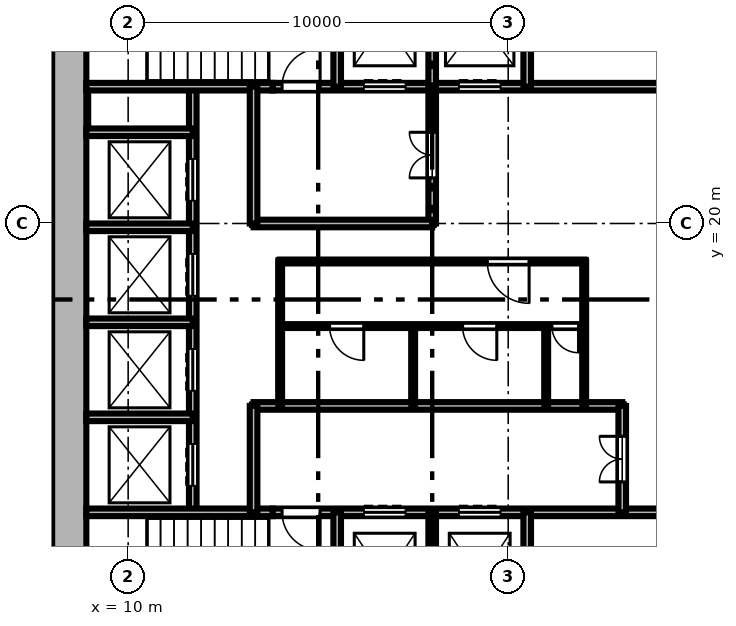
"""IFC4 building model, lengths in metres.
Left out: names, types, materials, properties, quantities, classifications, styles, units other than length and angle.
Written with IfcOpenShell. Run it as: python <this file> out.ifc"""

import sys

from ifc_helpers import new_model, si_unit, direction, frame, frame_2d, origin, place, context, subcontext, project, spatial, rectangle, extrude, element, fill, save


model = new_model("IFC4")
c1 = context("Model", 3, precision=1e-05, world=origin(), true_north=direction((0.0, 1.0)))
c2 = subcontext(c1, "Body", "Model", "MODEL_VIEW")
j1 = project(units=[si_unit("LENGTHUNIT", "METRE"), si_unit("PLANEANGLEUNIT", "RADIAN")], contexts=[c1])
p1 = place(None, origin())
s1 = spatial("IfcSite", under=j1, at=p1, CompositionType="ELEMENT")
p2 = place(p1, origin())
s2 = spatial("IfcBuilding", under=s1, at=p2, CompositionType="ELEMENT")
p3 = place(p2, frame((0.0, 0.0, 6.0)))
s3 = spatial("IfcBuildingStorey", under=s2, at=p3, CompositionType="ELEMENT", Elevation=6.0)
p4 = place(p3, frame((8.45, 27.1, 0.0), z_axis=(0.0, 0.0, 1.0), x_axis=(0.0, -1.0, 0.0)))
e1 = element("IfcWall", 1, at=p4, inside=s3, PredefinedType="SHEAR", context=c2, shape_type="SweptSolid", body=[
    extrude(rectangle(XDim=18.2, YDim=0.9, at=frame_2d((9.1, 0.0))), origin(), (0.0, 0.0, 1.0), 6.0),
])
p5 = place(p3, frame((8.9, 12.4, 0.0), z_axis=(0.0, 0.0, 1.0), x_axis=(1.0, 0.0, 0.0)))
e2 = element("IfcWall", 2, at=p5, inside=s3, PredefinedType="SHEAR", context=c2, shape_type="SweptSolid", body=[
    extrude(rectangle(XDim=4.9, YDim=0.2, at=frame_2d((2.45, 0.0))), origin(), (0.0, 0.0, 1.0), 5.68),
])
p6 = place(p3, frame((13.8, 12.4, 0.0), z_axis=(0.0, 0.0, 1.0), x_axis=(1.0, 0.0, 0.0)))
e3 = element("IfcWall", 3, at=p6, inside=s3, PredefinedType="SHEAR", context=c2, shape_type="SweptSolid", body=[
    extrude(rectangle(XDim=13.3, YDim=0.2, at=frame_2d((6.65, 0.0))), origin(), (0.0, 0.0, 1.0), 5.68),
])
p7 = place(p6, frame((2.4, 0.0, 0.0)))
e4 = element("IfcOpeningElement", 4, at=p7, cuts=e3, PredefinedType="OPENING", context=c2, shape_type="SweptSolid", body=[
    extrude(rectangle(XDim=1.1, YDim=2.1, at=frame_2d((0.55, 1.05))), frame((0.0, 0.11, 0.0), z_axis=(0.0, -1.0, 0.0), x_axis=(1.0, 0.0, 0.0)), (0.0, 0.0, 1.0), 0.22),
])
p8 = place(p6, frame((4.9, 0.0, 0.0)))
e5 = element("IfcOpeningElement", 5, at=p8, cuts=e3, PredefinedType="OPENING", context=c2, shape_type="SweptSolid", body=[
    extrude(rectangle(XDim=1.1, YDim=2.1, at=frame_2d((0.55, 1.05))), frame((0.0, 0.11, 0.0), z_axis=(0.0, -1.0, 0.0), x_axis=(1.0, 0.0, 0.0)), (0.0, 0.0, 1.0), 0.22),
])
p9 = place(p6, frame((0.25, 0.0, 0.0)))
e6 = element("IfcOpeningElement", 6, at=p9, cuts=e3, PredefinedType="OPENING", context=c2, shape_type="SweptSolid", body=[
    extrude(rectangle(XDim=1.0, YDim=2.1, at=frame_2d((0.5, 1.05))), frame((0.0, 0.11, 0.0), z_axis=(0.0, -1.0, 0.0), x_axis=(1.0, 0.0, 0.0)), (0.0, 0.0, 1.0), 0.22),
])
p10 = place(p3, frame((8.9, 14.9, 0.0), z_axis=(0.0, 0.0, 1.0), x_axis=(1.0, 0.0, 0.0)))
e7 = element("IfcWall", 7, at=p10, inside=s3, PredefinedType="SHEAR", context=c2, shape_type="SweptSolid", body=[
    extrude(rectangle(XDim=2.8, YDim=0.2, at=frame_2d((1.4, 0.0))), origin(), (0.0, 0.0, 1.0), 5.68),
])
p11 = place(p3, frame((13.3, 15.2, 0.0), z_axis=(0.0, 0.0, 1.0), x_axis=(1.0, 0.0, 0.0)))
e8 = element("IfcWall", 8, at=p11, inside=s3, PredefinedType="SHEAR", context=c2, shape_type="SweptSolid", body=[
    extrude(rectangle(XDim=9.7, YDim=0.2, at=frame_2d((4.85, 0.0))), origin(), (0.0, 0.0, 1.0), 5.68),
])
p12 = place(p3, frame((14.0, 17.3, 0.0), z_axis=(0.0, 0.0, 1.0), x_axis=(1.0, 0.0, 0.0)))
e9 = element("IfcWall", 9, at=p12, inside=s3, PredefinedType="PARTITIONING", context=c2, shape_type="SweptSolid", body=[
    extrude(rectangle(XDim=8.0, YDim=0.1, at=frame_2d((4.0, 0.0))), origin(), (0.0, 0.0, 1.0), 5.68),
])
p13 = place(p12, frame((1.3, 0.0, 0.0)))
e10 = element("IfcOpeningElement", 10, at=p13, cuts=e9, PredefinedType="OPENING", context=c2, shape_type="SweptSolid", body=[
    extrude(rectangle(XDim=0.9, YDim=2.1, at=frame_2d((0.45, 1.05))), frame((0.0, 0.06, 0.0), z_axis=(0.0, -1.0, 0.0), x_axis=(1.0, 0.0, 0.0)), (0.0, 0.0, 1.0), 0.12),
])
p14 = place(p12, frame((4.8, 0.0, 0.0)))
e11 = element("IfcOpeningElement", 11, at=p14, cuts=e9, PredefinedType="OPENING", context=c2, shape_type="SweptSolid", body=[
    extrude(rectangle(XDim=0.9, YDim=2.1, at=frame_2d((0.45, 1.05))), frame((0.0, 0.06, 0.0), z_axis=(0.0, -1.0, 0.0), x_axis=(1.0, 0.0, 0.0)), (0.0, 0.0, 1.0), 0.12),
])
p15 = place(p12, frame((7.15, 0.0, 0.0)))
e12 = element("IfcOpeningElement", 12, at=p15, cuts=e9, PredefinedType="OPENING", context=c2, shape_type="SweptSolid", body=[
    extrude(rectangle(XDim=0.7, YDim=2.1, at=frame_2d((0.35, 1.05))), frame((0.0, 0.06, 0.0), z_axis=(0.0, -1.0, 0.0), x_axis=(1.0, 0.0, 0.0)), (0.0, 0.0, 1.0), 0.12),
])
p16 = place(p3, frame((8.9, 17.4, 0.0), z_axis=(0.0, 0.0, 1.0), x_axis=(1.0, 0.0, 0.0)))
e13 = element("IfcWall", 13, at=p16, inside=s3, PredefinedType="SHEAR", context=c2, shape_type="SweptSolid", body=[
    extrude(rectangle(XDim=2.8, YDim=0.2, at=frame_2d((1.4, 0.0))), origin(), (0.0, 0.0, 1.0), 5.68),
])
p17 = place(p3, frame((14.0, 19.0, 0.0), z_axis=(0.0, 0.0, 1.0), x_axis=(1.0, 0.0, 0.0)))
e14 = element("IfcWall", 14, at=p17, inside=s3, PredefinedType="PARTITIONING", context=c2, shape_type="SweptSolid", body=[
    extrude(rectangle(XDim=8.0, YDim=0.1, at=frame_2d((4.0, 0.0))), origin(), (0.0, 0.0, 1.0), 5.68),
])
p18 = place(p17, frame((5.45, 0.0, 0.0)))
e15 = element("IfcOpeningElement", 15, at=p18, cuts=e14, PredefinedType="OPENING", context=c2, shape_type="SweptSolid", body=[
    extrude(rectangle(XDim=1.1, YDim=2.1, at=frame_2d((0.55, 1.05))), frame((0.0, 0.06, 0.0), z_axis=(0.0, -1.0, 0.0), x_axis=(1.0, 0.0, 0.0)), (0.0, 0.0, 1.0), 0.12),
])
p19 = place(p3, frame((8.9, 19.9, 0.0), z_axis=(0.0, 0.0, 1.0), x_axis=(1.0, 0.0, 0.0)))
e16 = element("IfcWall", 16, at=p19, inside=s3, PredefinedType="SHEAR", context=c2, shape_type="SweptSolid", body=[
    extrude(rectangle(XDim=2.8, YDim=0.2, at=frame_2d((1.4, 0.0))), origin(), (0.0, 0.0, 1.0), 5.68),
])
p20 = place(p3, frame((13.3, 20.0, 0.0), z_axis=(0.0, 0.0, 1.0), x_axis=(1.0, 0.0, 0.0)))
e17 = element("IfcWall", 17, at=p20, inside=s3, PredefinedType="SHEAR", context=c2, shape_type="SweptSolid", body=[
    extrude(rectangle(XDim=4.7, YDim=0.2, at=frame_2d((2.35, 0.0))), origin(), (0.0, 0.0, 1.0), 5.68),
])
p21 = place(p3, frame((8.9, 22.4, 0.0), z_axis=(0.0, 0.0, 1.0), x_axis=(1.0, 0.0, 0.0)))
e18 = element("IfcWall", 18, at=p21, inside=s3, PredefinedType="SHEAR", context=c2, shape_type="SweptSolid", body=[
    extrude(rectangle(XDim=2.8, YDim=0.2, at=frame_2d((1.4, 0.0))), origin(), (0.0, 0.0, 1.0), 5.68),
])
p22 = place(p3, frame((8.9, 23.6, 0.0), z_axis=(0.0, 0.0, 1.0), x_axis=(1.0, 0.0, 0.0)))
e19 = element("IfcWall", 19, at=p22, inside=s3, PredefinedType="SHEAR", context=c2, shape_type="SweptSolid", body=[
    extrude(rectangle(XDim=4.9, YDim=0.2, at=frame_2d((2.45, 0.0))), origin(), (0.0, 0.0, 1.0), 5.68),
])
p23 = place(p3, frame((13.8, 23.6, 0.0), z_axis=(0.0, 0.0, 1.0), x_axis=(1.0, 0.0, 0.0)))
e20 = element("IfcWall", 20, at=p23, inside=s3, PredefinedType="SHEAR", context=c2, shape_type="SweptSolid", body=[
    extrude(rectangle(XDim=13.3, YDim=0.2, at=frame_2d((6.65, 0.0))), origin(), (0.0, 0.0, 1.0), 5.68),
])
p24 = place(p23, frame((2.4, 0.0, 0.0)))
e21 = element("IfcOpeningElement", 21, at=p24, cuts=e20, PredefinedType="OPENING", context=c2, shape_type="SweptSolid", body=[
    extrude(rectangle(XDim=1.1, YDim=2.1, at=frame_2d((0.55, 1.05))), frame((0.0, 0.11, 0.0), z_axis=(0.0, -1.0, 0.0), x_axis=(1.0, 0.0, 0.0)), (0.0, 0.0, 1.0), 0.22),
])
p25 = place(p23, frame((4.9, 0.0, 0.0)))
e22 = element("IfcOpeningElement", 22, at=p25, cuts=e20, PredefinedType="OPENING", context=c2, shape_type="SweptSolid", body=[
    extrude(rectangle(XDim=1.1, YDim=2.1, at=frame_2d((0.55, 1.05))), frame((0.0, 0.11, 0.0), z_axis=(0.0, -1.0, 0.0), x_axis=(1.0, 0.0, 0.0)), (0.0, 0.0, 1.0), 0.22),
])
p26 = place(p23, frame((0.25, 0.0, 0.0)))
e23 = element("IfcOpeningElement", 23, at=p26, cuts=e20, PredefinedType="OPENING", context=c2, shape_type="SweptSolid", body=[
    extrude(rectangle(XDim=1.0, YDim=2.1, at=frame_2d((0.5, 1.05))), frame((0.0, 0.11, 0.0), z_axis=(0.0, -1.0, 0.0), x_axis=(1.0, 0.0, 0.0)), (0.0, 0.0, 1.0), 0.22),
])
p27 = place(p3, frame((11.7, 12.4, 0.0), z_axis=(0.0, 0.0, 1.0), x_axis=(0.0, 1.0, 0.0)))
e24 = element("IfcWall", 24, at=p27, inside=s3, PredefinedType="SHEAR", context=c2, shape_type="SweptSolid", body=[
    extrude(rectangle(XDim=11.2, YDim=0.2, at=frame_2d((5.6, 0.0))), origin(), (0.0, 0.0, 1.0), 5.68),
])
p28 = place(p27, frame((0.7, 0.0, 0.0)))
e25 = element("IfcOpeningElement", 25, at=p28, cuts=e24, PredefinedType="OPENING", context=c2, shape_type="SweptSolid", body=[
    extrude(rectangle(XDim=1.1, YDim=2.1, at=frame_2d((0.55, 1.05))), frame((0.0, 0.11, 0.0), z_axis=(0.0, -1.0, 0.0), x_axis=(1.0, 0.0, 0.0)), (0.0, 0.0, 1.0), 0.22),
])
p29 = place(p27, frame((3.2, 0.0, 0.0)))
e26 = element("IfcOpeningElement", 26, at=p29, cuts=e24, PredefinedType="OPENING", context=c2, shape_type="SweptSolid", body=[
    extrude(rectangle(XDim=1.1, YDim=2.1, at=frame_2d((0.55, 1.05))), frame((0.0, 0.11, 0.0), z_axis=(0.0, -1.0, 0.0), x_axis=(1.0, 0.0, 0.0)), (0.0, 0.0, 1.0), 0.22),
])
p30 = place(p27, frame((5.7, 0.0, 0.0)))
e27 = element("IfcOpeningElement", 27, at=p30, cuts=e24, PredefinedType="OPENING", context=c2, shape_type="SweptSolid", body=[
    extrude(rectangle(XDim=1.1, YDim=2.1, at=frame_2d((0.55, 1.05))), frame((0.0, 0.11, 0.0), z_axis=(0.0, -1.0, 0.0), x_axis=(1.0, 0.0, 0.0)), (0.0, 0.0, 1.0), 0.22),
])
p31 = place(p27, frame((8.2, 0.0, 0.0)))
e28 = element("IfcOpeningElement", 28, at=p31, cuts=e24, PredefinedType="OPENING", context=c2, shape_type="SweptSolid", body=[
    extrude(rectangle(XDim=1.1, YDim=2.1, at=frame_2d((0.55, 1.05))), frame((0.0, 0.11, 0.0), z_axis=(0.0, -1.0, 0.0), x_axis=(1.0, 0.0, 0.0)), (0.0, 0.0, 1.0), 0.22),
])
p32 = place(p3, frame((13.3, 12.4, 0.0), z_axis=(0.0, 0.0, 1.0), x_axis=(0.0, 1.0, 0.0)))
e29 = element("IfcWall", 29, at=p32, inside=s3, PredefinedType="SHEAR", context=c2, shape_type="SweptSolid", body=[
    extrude(rectangle(XDim=2.8, YDim=0.2, at=frame_2d((1.4, 0.0))), origin(), (0.0, 0.0, 1.0), 5.68),
])
p33 = place(p3, frame((13.3, 20.0, 0.0), z_axis=(0.0, 0.0, 1.0), x_axis=(0.0, 1.0, 0.0)))
e30 = element("IfcWall", 30, at=p33, inside=s3, PredefinedType="SHEAR", context=c2, shape_type="SweptSolid", body=[
    extrude(rectangle(XDim=3.6, YDim=0.2, at=frame_2d((1.8, 0.0))), origin(), (0.0, 0.0, 1.0), 5.68),
])
p34 = place(p3, frame((14.0, 15.2, 0.0), z_axis=(0.0, 0.0, 1.0), x_axis=(0.0, 1.0, 0.0)))
e31 = element("IfcWall", 31, at=p34, inside=s3, PredefinedType="PARTITIONING", context=c2, shape_type="SweptSolid", body=[
    extrude(rectangle(XDim=3.8, YDim=0.1, at=frame_2d((1.9, 0.0))), origin(), (0.0, 0.0, 1.0), 5.68),
])
for number, where, z_axis, x_axis in (
    (32, (15.5, 8.9, 0.0), (0.0, 0.0, 1.0), (0.0, 1.0, 0.0)),
    (33, (15.5, 23.6, 0.0), (0.0, 0.0, 1.0), (0.0, 1.0, 0.0)),
):
    element("IfcWall", number, at=place(p3, frame(where, z_axis=z_axis, x_axis=x_axis)), inside=s3, PredefinedType="SHEAR", context=c2, shape_type="SweptSolid", body=[
        extrude(rectangle(XDim=3.5, YDim=0.2, at=frame_2d((1.75, 0.0))), origin(), (0.0, 0.0, 1.0), 5.68),
    ])
p35 = place(p3, frame((17.5, 15.2, 0.0), z_axis=(0.0, 0.0, 1.0), x_axis=(0.0, 1.0, 0.0)))
e34 = element("IfcWall", 34, at=p35, inside=s3, PredefinedType="PARTITIONING", context=c2, shape_type="SweptSolid", body=[
    extrude(rectangle(XDim=2.1, YDim=0.1, at=frame_2d((1.05, 0.0))), origin(), (0.0, 0.0, 1.0), 5.68),
])
p36 = place(p3, frame((18.0, 8.9, 0.0), z_axis=(0.0, 0.0, 1.0), x_axis=(0.0, 1.0, 0.0)))
e35 = element("IfcWall", 35, at=p36, inside=s3, PredefinedType="SHEAR", context=c2, shape_type="SweptSolid", body=[
    extrude(rectangle(XDim=3.5, YDim=0.2, at=frame_2d((1.75, 0.0))), origin(), (0.0, 0.0, 1.0), 5.68),
])
p37 = place(p3, frame((18.0, 20.0, 0.0), z_axis=(0.0, 0.0, 1.0), x_axis=(0.0, 1.0, 0.0)))
e36 = element("IfcWall", 36, at=p37, inside=s3, PredefinedType="SHEAR", context=c2, shape_type="SweptSolid", body=[
    extrude(rectangle(XDim=7.1, YDim=0.2, at=frame_2d((3.55, 0.0))), origin(), (0.0, 0.0, 1.0), 5.68),
])
p38 = place(p37, frame((1.2, 0.0, 0.0)))
e37 = element("IfcOpeningElement", 37, at=p38, cuts=e36, PredefinedType="OPENING", context=c2, shape_type="SweptSolid", body=[
    extrude(rectangle(XDim=1.2, YDim=2.1, at=frame_2d((0.6, 1.05))), frame((0.0, 0.11, 0.0), z_axis=(0.0, -1.0, 0.0), x_axis=(1.0, 0.0, 0.0)), (0.0, 0.0, 1.0), 0.22),
])
for number, where, z_axis, x_axis in (
    (38, (20.5, 8.9, 0.0), (0.0, 0.0, 1.0), (0.0, 1.0, 0.0)),
    (39, (20.5, 23.6, 0.0), (0.0, 0.0, 1.0), (0.0, 1.0, 0.0)),
):
    element("IfcWall", number, at=place(p3, frame(where, z_axis=z_axis, x_axis=x_axis)), inside=s3, PredefinedType="SHEAR", context=c2, shape_type="SweptSolid", body=[
        extrude(rectangle(XDim=3.5, YDim=0.2, at=frame_2d((1.75, 0.0))), origin(), (0.0, 0.0, 1.0), 5.68),
    ])
p39 = place(p3, frame((21.0, 15.2, 0.0), z_axis=(0.0, 0.0, 1.0), x_axis=(0.0, 1.0, 0.0)))
e40 = element("IfcWall", 40, at=p39, inside=s3, PredefinedType="PARTITIONING", context=c2, shape_type="SweptSolid", body=[
    extrude(rectangle(XDim=2.1, YDim=0.1, at=frame_2d((1.05, 0.0))), origin(), (0.0, 0.0, 1.0), 5.68),
])
p40 = place(p3, frame((22.0, 15.2, 0.0), z_axis=(0.0, 0.0, 1.0), x_axis=(0.0, 1.0, 0.0)))
e41 = element("IfcWall", 41, at=p40, inside=s3, PredefinedType="PARTITIONING", context=c2, shape_type="SweptSolid", body=[
    extrude(rectangle(XDim=3.8, YDim=0.1, at=frame_2d((1.9, 0.0))), origin(), (0.0, 0.0, 1.0), 5.68),
])
p41 = place(p3, frame((23.0, 12.4, 0.0), z_axis=(0.0, 0.0, 1.0), x_axis=(0.0, 1.0, 0.0)))
e42 = element("IfcWall", 42, at=p41, inside=s3, PredefinedType="SHEAR", context=c2, shape_type="SweptSolid", body=[
    extrude(rectangle(XDim=2.8, YDim=0.2, at=frame_2d((1.4, 0.0))), origin(), (0.0, 0.0, 1.0), 5.68),
])
p42 = place(p41, frame((0.8, 0.0, 0.0)))
e43 = element("IfcOpeningElement", 43, at=p42, cuts=e42, PredefinedType="OPENING", context=c2, shape_type="SweptSolid", body=[
    extrude(rectangle(XDim=1.2, YDim=2.1, at=frame_2d((0.6, 1.05))), frame((0.0, 0.11, 0.0), z_axis=(0.0, -1.0, 0.0), x_axis=(1.0, 0.0, 0.0)), (0.0, 0.0, 1.0), 0.22),
])
p43 = place(p28, origin())
e44 = element("IfcDoor", 44, at=p43, inside=s3, OperationType="DOUBLE_DOOR_SLIDING", PredefinedType="DOOR", context=c2, shape_type="SweptSolid", body=[
    extrude(rectangle(XDim=1.1, YDim=2.1, at=frame_2d((0.55, 1.05))), frame((0.0, 0.025, 0.0), z_axis=(0.0, -1.0, 0.0), x_axis=(1.0, 0.0, 0.0)), (0.0, 0.0, 1.0), 0.05),
])
fill(e25, e44)
p44 = place(p29, origin())
e45 = element("IfcDoor", 45, at=p44, inside=s3, OperationType="DOUBLE_DOOR_SLIDING", PredefinedType="DOOR", context=c2, shape_type="SweptSolid", body=[
    extrude(rectangle(XDim=1.1, YDim=2.1, at=frame_2d((0.55, 1.05))), frame((0.0, 0.025, 0.0), z_axis=(0.0, -1.0, 0.0), x_axis=(1.0, 0.0, 0.0)), (0.0, 0.0, 1.0), 0.05),
])
fill(e26, e45)
p45 = place(p30, origin())
e46 = element("IfcDoor", 46, at=p45, inside=s3, OperationType="DOUBLE_DOOR_SLIDING", PredefinedType="DOOR", context=c2, shape_type="SweptSolid", body=[
    extrude(rectangle(XDim=1.1, YDim=2.1, at=frame_2d((0.55, 1.05))), frame((0.0, 0.025, 0.0), z_axis=(0.0, -1.0, 0.0), x_axis=(1.0, 0.0, 0.0)), (0.0, 0.0, 1.0), 0.05),
])
fill(e27, e46)
p46 = place(p31, origin())
e47 = element("IfcDoor", 47, at=p46, inside=s3, OperationType="DOUBLE_DOOR_SLIDING", PredefinedType="DOOR", context=c2, shape_type="SweptSolid", body=[
    extrude(rectangle(XDim=1.1, YDim=2.1, at=frame_2d((0.55, 1.05))), frame((0.0, 0.025, 0.0), z_axis=(0.0, -1.0, 0.0), x_axis=(1.0, 0.0, 0.0)), (0.0, 0.0, 1.0), 0.05),
])
fill(e28, e47)
p47 = place(p7, origin())
e48 = element("IfcDoor", 48, at=p47, inside=s3, OperationType="DOUBLE_DOOR_SLIDING", PredefinedType="DOOR", context=c2, shape_type="SweptSolid", body=[
    extrude(rectangle(XDim=1.1, YDim=2.1, at=frame_2d((0.55, 1.05))), frame((0.0, 0.025, 0.0), z_axis=(0.0, -1.0, 0.0), x_axis=(1.0, 0.0, 0.0)), (0.0, 0.0, 1.0), 0.05),
])
fill(e4, e48)
p48 = place(p8, origin())
e49 = element("IfcDoor", 49, at=p48, inside=s3, OperationType="DOUBLE_DOOR_SLIDING", PredefinedType="DOOR", context=c2, shape_type="SweptSolid", body=[
    extrude(rectangle(XDim=1.1, YDim=2.1, at=frame_2d((0.55, 1.05))), frame((0.0, 0.025, 0.0), z_axis=(0.0, -1.0, 0.0), x_axis=(1.0, 0.0, 0.0)), (0.0, 0.0, 1.0), 0.05),
])
fill(e5, e49)
p49 = place(p24, origin())
e50 = element("IfcDoor", 50, at=p49, inside=s3, OperationType="DOUBLE_DOOR_SLIDING", PredefinedType="DOOR", context=c2, shape_type="SweptSolid", body=[
    extrude(rectangle(XDim=1.1, YDim=2.1, at=frame_2d((0.55, 1.05))), frame((0.0, 0.025, 0.0), z_axis=(0.0, -1.0, 0.0), x_axis=(1.0, 0.0, 0.0)), (0.0, 0.0, 1.0), 0.05),
])
fill(e21, e50)
p50 = place(p25, origin())
e51 = element("IfcDoor", 51, at=p50, inside=s3, OperationType="DOUBLE_DOOR_SLIDING", PredefinedType="DOOR", context=c2, shape_type="SweptSolid", body=[
    extrude(rectangle(XDim=1.1, YDim=2.1, at=frame_2d((0.55, 1.05))), frame((0.0, 0.025, 0.0), z_axis=(0.0, -1.0, 0.0), x_axis=(1.0, 0.0, 0.0)), (0.0, 0.0, 1.0), 0.05),
])
fill(e22, e51)
p51 = place(p9, frame((1.0, 0.0, 0.0), z_axis=(0.0, 0.0, 1.0), x_axis=(-1.0, 0.0, 0.0)))
e52 = element("IfcDoor", 52, at=p51, inside=s3, OperationType="SINGLE_SWING_LEFT", PredefinedType="DOOR", context=c2, shape_type="SweptSolid", body=[
    extrude(rectangle(XDim=1.0, YDim=2.1, at=frame_2d((0.5, 1.05))), frame((0.0, 0.025, 0.0), z_axis=(0.0, -1.0, 0.0), x_axis=(1.0, 0.0, 0.0)), (0.0, 0.0, 1.0), 0.05),
])
fill(e6, e52)
p52 = place(p26, origin())
e53 = element("IfcDoor", 53, at=p52, inside=s3, OperationType="SINGLE_SWING_RIGHT", PredefinedType="DOOR", context=c2, shape_type="SweptSolid", body=[
    extrude(rectangle(XDim=1.0, YDim=2.1, at=frame_2d((0.5, 1.05))), frame((0.0, 0.025, 0.0), z_axis=(0.0, -1.0, 0.0), x_axis=(1.0, 0.0, 0.0)), (0.0, 0.0, 1.0), 0.05),
])
fill(e23, e53)
p53 = place(p42, origin())
e54 = element("IfcDoor", 54, at=p53, inside=s3, OperationType="DOUBLE_DOOR_SINGLE_SWING", PredefinedType="DOOR", context=c2, shape_type="SweptSolid", body=[
    extrude(rectangle(XDim=1.2, YDim=2.1, at=frame_2d((0.6, 1.05))), frame((0.0, 0.025, 0.0), z_axis=(0.0, -1.0, 0.0), x_axis=(1.0, 0.0, 0.0)), (0.0, 0.0, 1.0), 0.05),
])
fill(e43, e54)
p54 = place(p38, origin())
e55 = element("IfcDoor", 55, at=p54, inside=s3, OperationType="DOUBLE_DOOR_SINGLE_SWING", PredefinedType="DOOR", context=c2, shape_type="SweptSolid", body=[
    extrude(rectangle(XDim=1.2, YDim=2.1, at=frame_2d((0.6, 1.05))), frame((0.0, 0.025, 0.0), z_axis=(0.0, -1.0, 0.0), x_axis=(1.0, 0.0, 0.0)), (0.0, 0.0, 1.0), 0.05),
])
fill(e37, e55)
p55 = place(p18, frame((1.1, 0.0, 0.0), z_axis=(0.0, 0.0, 1.0), x_axis=(-1.0, 0.0, 0.0)))
e56 = element("IfcDoor", 56, at=p55, inside=s3, OperationType="SINGLE_SWING_LEFT", PredefinedType="DOOR", context=c2, shape_type="SweptSolid", body=[
    extrude(rectangle(XDim=1.1, YDim=2.1, at=frame_2d((0.55, 1.05))), frame((0.0, 0.025, 0.0), z_axis=(0.0, -1.0, 0.0), x_axis=(1.0, 0.0, 0.0)), (0.0, 0.0, 1.0), 0.05),
])
fill(e15, e56)
p56 = place(p13, frame((0.9, 0.0, 0.0), z_axis=(0.0, 0.0, 1.0), x_axis=(-1.0, 0.0, 0.0)))
e57 = element("IfcDoor", 57, at=p56, inside=s3, OperationType="SINGLE_SWING_LEFT", PredefinedType="DOOR", context=c2, shape_type="SweptSolid", body=[
    extrude(rectangle(XDim=0.9, YDim=2.1, at=frame_2d((0.45, 1.05))), frame((0.0, 0.025, 0.0), z_axis=(0.0, -1.0, 0.0), x_axis=(1.0, 0.0, 0.0)), (0.0, 0.0, 1.0), 0.05),
])
fill(e10, e57)
p57 = place(p14, frame((0.9, 0.0, 0.0), z_axis=(0.0, 0.0, 1.0), x_axis=(-1.0, 0.0, 0.0)))
e58 = element("IfcDoor", 58, at=p57, inside=s3, OperationType="SINGLE_SWING_LEFT", PredefinedType="DOOR", context=c2, shape_type="SweptSolid", body=[
    extrude(rectangle(XDim=0.9, YDim=2.1, at=frame_2d((0.45, 1.05))), frame((0.0, 0.025, 0.0), z_axis=(0.0, -1.0, 0.0), x_axis=(1.0, 0.0, 0.0)), (0.0, 0.0, 1.0), 0.05),
])
fill(e11, e58)
p58 = place(p15, frame((0.7, 0.0, 0.0), z_axis=(0.0, 0.0, 1.0), x_axis=(-1.0, 0.0, 0.0)))
e59 = element("IfcDoor", 59, at=p58, inside=s3, OperationType="SINGLE_SWING_LEFT", PredefinedType="DOOR", context=c2, shape_type="SweptSolid", body=[
    extrude(rectangle(XDim=0.7, YDim=2.1, at=frame_2d((0.35, 1.05))), frame((0.0, 0.025, 0.0), z_axis=(0.0, -1.0, 0.0), x_axis=(1.0, 0.0, 0.0)), (0.0, 0.0, 1.0), 0.05),
])
fill(e12, e59)
save(model, sys.argv[1])
